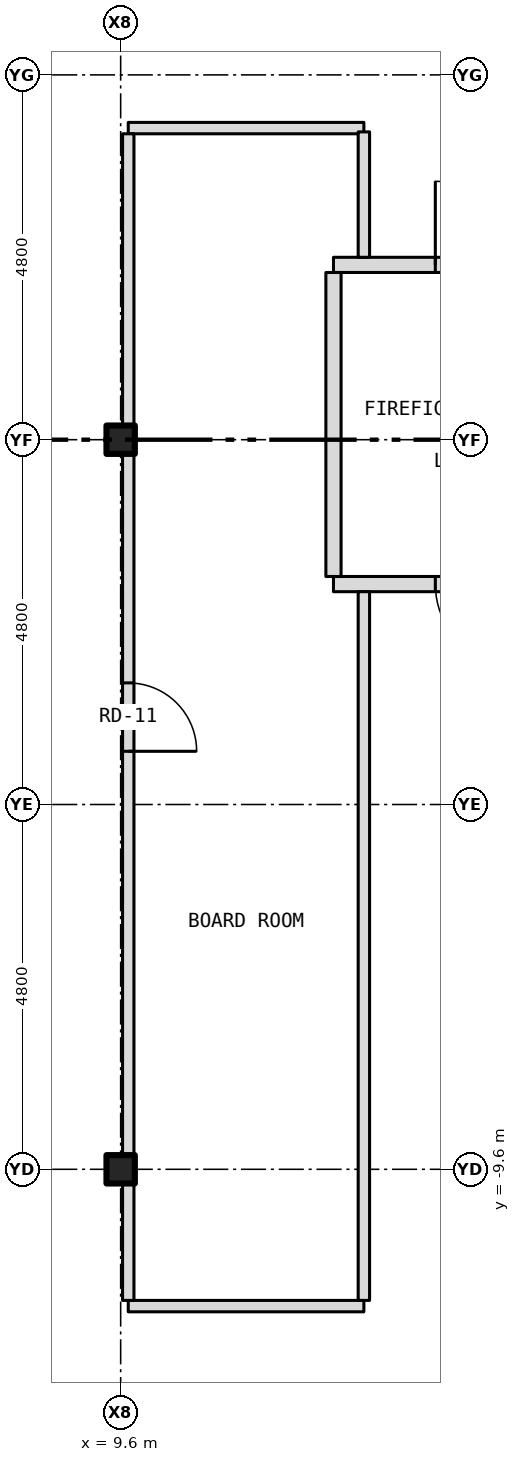
"""IFC4 building model, lengths in metres.
Left out: names, types, materials, properties, quantities, classifications, styles, units other than length and angle.
Written with IfcOpenShell. Run it as: python <this file> out.ifc"""

import sys

from ifc_helpers import new_model, si_unit, direction, frame, frame_2d, origin, origin_2d, place, context, subcontext, project, spatial, rectangle, i_section, extrude, element, fill, save


model = new_model("IFC4")
c1 = context("Model", 3, precision=1e-05, world=origin(), true_north=direction((0.0, 1.0)))
c2 = subcontext(c1, "Body", "Model", "MODEL_VIEW")
j1 = project(units=[si_unit("LENGTHUNIT", "METRE"), si_unit("PLANEANGLEUNIT", "RADIAN")], contexts=[c1])
p1 = place(None, origin())
s1 = spatial("IfcSite", under=j1, at=p1, CompositionType="ELEMENT")
p2 = place(p1, origin())
s2 = spatial("IfcBuilding", under=s1, at=p2, CompositionType="ELEMENT")
p3 = place(p2, frame((0.0, 0.0, 172.5)))
s3 = spatial("IfcBuildingStorey", under=s2, at=p3, CompositionType="ELEMENT", Elevation=172.5)
for number, where, z_axis, x_axis in (
    (1, (9.6, -9.6, -0.15), (0.0, 0.0, 1.0), (1.0, 0.0, 0.0)),
    (2, (9.6, 0.0, -0.15), (0.0, 0.0, 1.0), (1.0, 0.0, 0.0)),
):
    element("IfcColumn", number, at=place(p3, frame(where, z_axis=z_axis, x_axis=x_axis)), inside=s3, PredefinedType="COLUMN", context=c2, shape_type="SweptSolid", body=[
        extrude(i_section(OverallWidth=0.373, OverallDepth=0.373, WebThickness=0.016, FlangeThickness=0.026, at=origin_2d()), origin(), (0.0, 0.0, 1.0), 3.5),
    ])
p4 = place(p3, frame((9.7, -11.4, 0.0), z_axis=(0.0, 0.0, 1.0), x_axis=(1.0, 0.0, 0.0)))
e3 = element("IfcWall", 3, at=p4, inside=s3, PredefinedType="PARTITIONING", context=c2, shape_type="SweptSolid", body=[
    extrude(rectangle(XDim=3.1, YDim=0.15, at=frame_2d((1.55, 0.0))), origin(), (0.0, 0.0, 1.0), 3.35),
])
p5 = place(p3, frame((12.4, -1.9, 0.0), z_axis=(0.0, 0.0, 1.0), x_axis=(1.0, 0.0, 0.0)))
e4 = element("IfcWall", 4, at=p5, inside=s3, PredefinedType="PARTITIONING", context=c2, shape_type="SweptSolid", body=[
    extrude(rectangle(XDim=3.28, YDim=0.2, at=frame_2d((1.64, 0.0))), origin(), (0.0, 0.0, 1.0), 3.35),
])
p6 = place(p5, frame((1.34, 0.0, 0.0)))
e5 = element("IfcOpeningElement", 5, at=p6, cuts=e4, PredefinedType="OPENING", context=c2, shape_type="SweptSolid", body=[
    extrude(rectangle(XDim=1.1, YDim=2.1, at=frame_2d((0.55, 1.05))), frame((0.0, 0.112, 0.0), z_axis=(0.0, -1.0, 0.0), x_axis=(1.0, 0.0, 0.0)), (0.0, 0.0, 1.0), 0.224),
])
p7 = place(p3, frame((12.4, 2.3, 0.0), z_axis=(0.0, 0.0, 1.0), x_axis=(1.0, 0.0, 0.0)))
e6 = element("IfcWall", 6, at=p7, inside=s3, PredefinedType="PARTITIONING", context=c2, shape_type="SweptSolid", body=[
    extrude(rectangle(XDim=3.28, YDim=0.2, at=frame_2d((1.64, 0.0))), origin(), (0.0, 0.0, 1.0), 3.35),
])
p8 = place(p7, frame((1.34, 0.0, 0.0)))
e7 = element("IfcOpeningElement", 7, at=p8, cuts=e6, PredefinedType="OPENING", context=c2, shape_type="SweptSolid", body=[
    extrude(rectangle(XDim=1.1, YDim=2.1, at=frame_2d((0.55, 1.05))), frame((0.0, 0.112, 0.0), z_axis=(0.0, -1.0, 0.0), x_axis=(1.0, 0.0, 0.0)), (0.0, 0.0, 1.0), 0.224),
])
p9 = place(p3, frame((9.7, 4.1, 0.0), z_axis=(0.0, 0.0, 1.0), x_axis=(1.0, 0.0, 0.0)))
e8 = element("IfcWall", 8, at=p9, inside=s3, PredefinedType="PARTITIONING", context=c2, shape_type="SweptSolid", body=[
    extrude(rectangle(XDim=3.1, YDim=0.15, at=frame_2d((1.55, 0.0))), origin(), (0.0, 0.0, 1.0), 3.35),
])
p10 = place(p3, frame((9.7, -11.325, 0.0), z_axis=(0.0, 0.0, 1.0), x_axis=(0.0, 1.0, 0.0)))
e9 = element("IfcWall", 9, at=p10, inside=s3, PredefinedType="PARTITIONING", context=c2, shape_type="SweptSolid", body=[
    extrude(rectangle(XDim=1.538, YDim=0.15, at=frame_2d((0.769, 0.0))), origin(), (0.0, 0.0, 1.0), 2.728),
])
p11 = place(p3, frame((9.7, -9.787, 0.0), z_axis=(0.0, 0.0, 1.0), x_axis=(0.0, 1.0, 0.0)))
e10 = element("IfcWall", 10, at=p11, inside=s3, PredefinedType="PARTITIONING", context=c2, shape_type="SweptSolid", body=[
    extrude(rectangle(XDim=0.374, YDim=0.15, at=frame_2d((0.187, 0.0))), origin(), (0.0, 0.0, 1.0), 3.35),
])
p12 = place(p3, frame((9.7, -9.413, 0.0), z_axis=(0.0, 0.0, 1.0), x_axis=(0.0, 1.0, 0.0)))
e11 = element("IfcWall", 11, at=p12, inside=s3, PredefinedType="PARTITIONING", context=c2, shape_type="SweptSolid", body=[
    extrude(rectangle(XDim=9.226, YDim=0.15, at=frame_2d((4.613, 0.0))), origin(), (0.0, 0.0, 1.0), 2.728),
])
p13 = place(p12, frame((5.313, 0.0, 0.0)))
e12 = element("IfcOpeningElement", 12, at=p13, cuts=e11, PredefinedType="OPENING", context=c2, shape_type="SweptSolid", body=[
    extrude(rectangle(XDim=0.9, YDim=2.1, at=frame_2d((0.45, 1.05))), frame((0.0, 0.087, 0.0), z_axis=(0.0, -1.0, 0.0), x_axis=(1.0, 0.0, 0.0)), (0.0, 0.0, 1.0), 0.174),
])
p14 = place(p3, frame((9.7, -0.187, 0.0), z_axis=(0.0, 0.0, 1.0), x_axis=(0.0, 1.0, 0.0)))
e13 = element("IfcWall", 13, at=p14, inside=s3, PredefinedType="PARTITIONING", context=c2, shape_type="SweptSolid", body=[
    extrude(rectangle(XDim=0.374, YDim=0.15, at=frame_2d((0.187, 0.0))), origin(), (0.0, 0.0, 1.0), 3.35),
])
p15 = place(p3, frame((9.7, 0.187, 0.0), z_axis=(0.0, 0.0, 1.0), x_axis=(0.0, 1.0, 0.0)))
e14 = element("IfcWall", 14, at=p15, inside=s3, PredefinedType="PARTITIONING", context=c2, shape_type="SweptSolid", body=[
    extrude(rectangle(XDim=3.838, YDim=0.15, at=frame_2d((1.919, 0.0))), origin(), (0.0, 0.0, 1.0), 2.728),
])
p16 = place(p3, frame((12.4, -1.8, 0.0), z_axis=(0.0, 0.0, 1.0), x_axis=(0.0, 1.0, 0.0)))
e15 = element("IfcWall", 15, at=p16, inside=s3, PredefinedType="PARTITIONING", context=c2, shape_type="SweptSolid", body=[
    extrude(rectangle(XDim=4.0, YDim=0.2, at=frame_2d((2.0, 0.0))), origin(), (0.0, 0.0, 1.0), 3.35),
])
p17 = place(p3, frame((12.8, -11.325, 0.0), z_axis=(0.0, 0.0, 1.0), x_axis=(0.0, 1.0, 0.0)))
e16 = element("IfcWall", 16, at=p17, inside=s3, PredefinedType="PARTITIONING", context=c2, shape_type="SweptSolid", body=[
    extrude(rectangle(XDim=9.325, YDim=0.15, at=frame_2d((4.663, 0.0))), origin(), (0.0, 0.0, 1.0), 3.35),
])
p18 = place(p3, frame((12.8, 2.4, 0.0), z_axis=(0.0, 0.0, 1.0), x_axis=(0.0, 1.0, 0.0)))
e17 = element("IfcWall", 17, at=p18, inside=s3, PredefinedType="PARTITIONING", context=c2, shape_type="SweptSolid", body=[
    extrude(rectangle(XDim=1.65, YDim=0.15, at=frame_2d((0.825, 0.0))), origin(), (0.0, 0.0, 1.0), 3.35),
])
p19 = place(p8, origin())
e18 = element("IfcDoor", 18, at=p19, inside=s3, OperationType="SINGLE_SWING_LEFT", PredefinedType="DOOR", context=c2, shape_type="SweptSolid", body=[
    extrude(rectangle(XDim=1.1, YDim=2.1, at=frame_2d((0.55, 1.05))), frame((0.0, 0.025, 0.0), z_axis=(0.0, -1.0, 0.0), x_axis=(1.0, 0.0, 0.0)), (0.0, 0.0, 1.0), 0.05),
])
fill(e7, e18)
p20 = place(p6, origin())
e19 = element("IfcDoor", 19, at=p20, inside=s3, OperationType="SINGLE_SWING_RIGHT", PredefinedType="DOOR", context=c2, shape_type="SweptSolid", body=[
    extrude(rectangle(XDim=1.1, YDim=2.1, at=frame_2d((0.55, 1.05))), frame((0.0, 0.025, 0.0), z_axis=(0.0, -1.0, 0.0), x_axis=(1.0, 0.0, 0.0)), (0.0, 0.0, 1.0), 0.05),
])
fill(e5, e19)
p21 = place(p13, origin())
e20 = element("IfcDoor", 20, at=p21, inside=s3, OperationType="SINGLE_SWING_LEFT", PredefinedType="DOOR", context=c2, shape_type="SweptSolid", body=[
    extrude(rectangle(XDim=0.9, YDim=2.1, at=frame_2d((0.45, 1.05))), frame((0.0, 0.025, 0.0), z_axis=(0.0, -1.0, 0.0), x_axis=(1.0, 0.0, 0.0)), (0.0, 0.0, 1.0), 0.05),
])
fill(e12, e20)
save(model, sys.argv[1])
